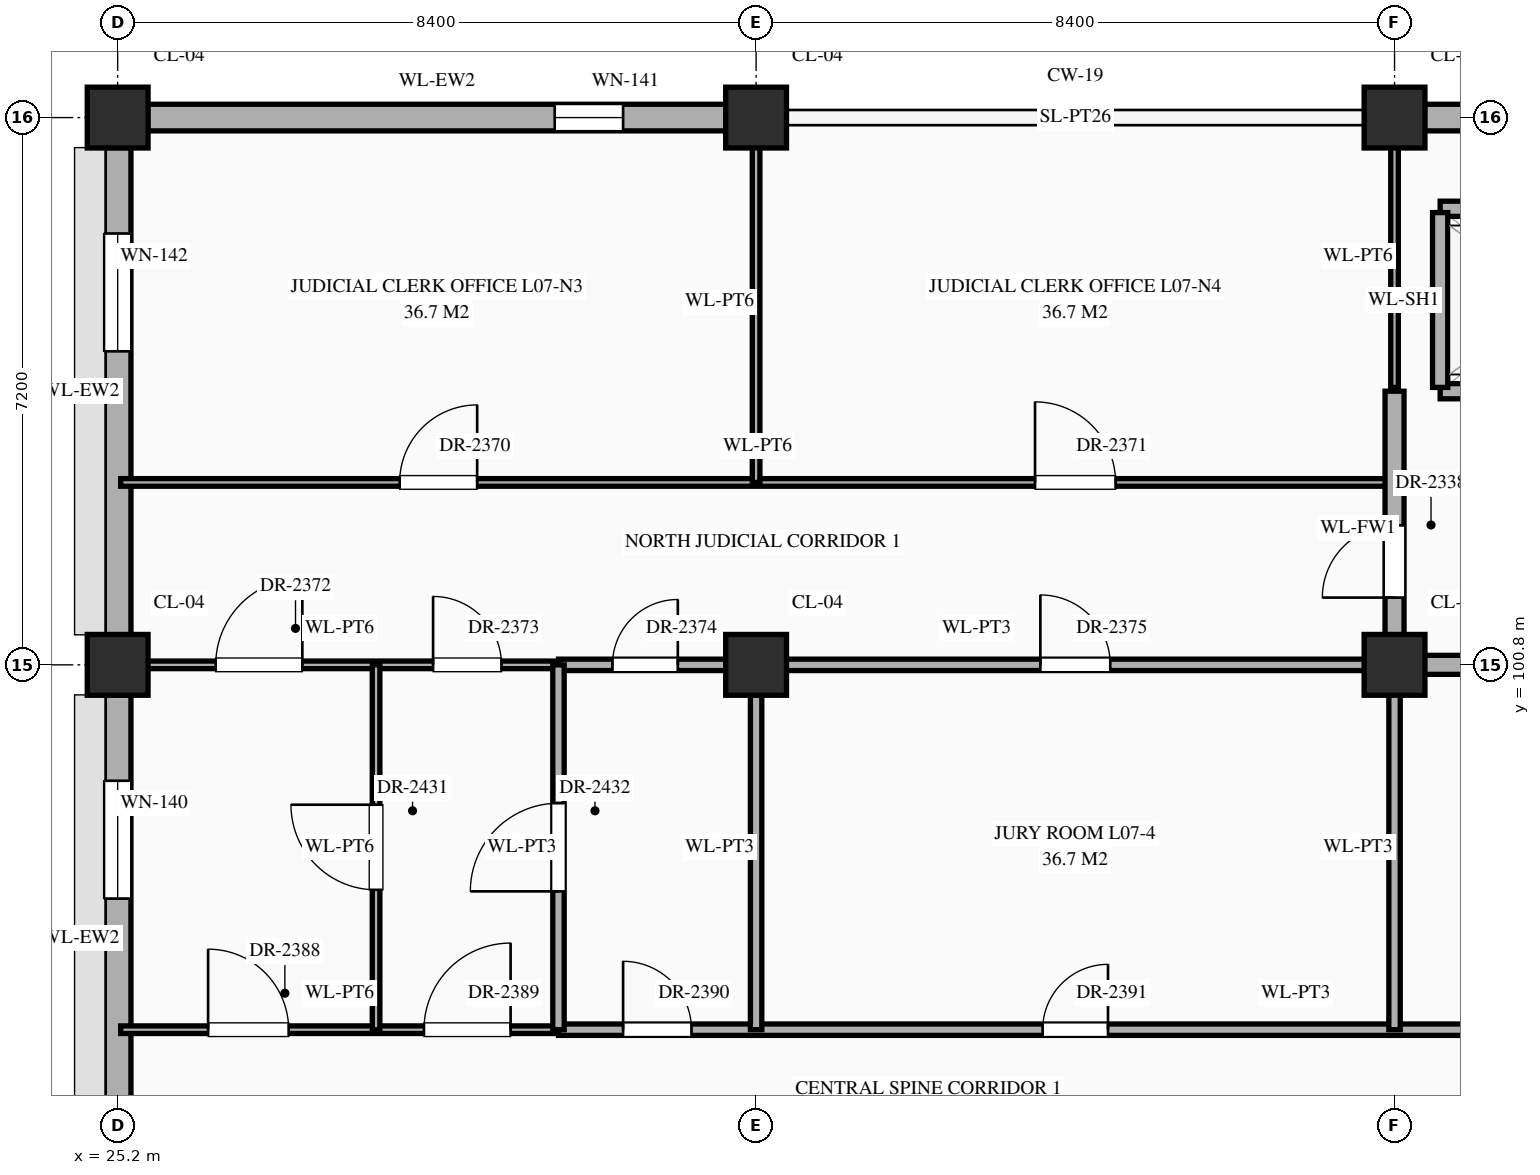
"""IFC4 building model, lengths in metres.
Left out: names, types, materials, properties, quantities, classifications, styles, units other than length and angle.
Written with IfcOpenShell. Run it as: python <this file> out.ifc"""

import sys

from ifc_helpers import new_model, si_unit, direction, frame, frame_2d, origin, origin_2d, place, context, subcontext, project, spatial, rectangle, extrude, element, fill, save


model = new_model("IFC4")
c1 = context("Model", 3, precision=1e-05, world=origin(), true_north=direction((0.0, 1.0)))
c2 = subcontext(c1, "Body", "Model", "MODEL_VIEW")
j1 = project(units=[si_unit("LENGTHUNIT", "METRE"), si_unit("PLANEANGLEUNIT", "RADIAN")], contexts=[c1])
p1 = place(None, origin())
s1 = spatial("IfcSite", under=j1, at=p1, CompositionType="ELEMENT")
p2 = place(p1, origin())
s2 = spatial("IfcBuilding", under=s1, at=p2, CompositionType="ELEMENT")
p3 = place(p2, frame((0.0, 0.0, 30.6)))
s3 = spatial("IfcBuildingStorey", under=s2, at=p3, CompositionType="ELEMENT", Elevation=30.6)
for number, where, z_axis, x_axis in (
    (1, (25.2, 100.8, 0.0), (0.0, 0.0, 1.0), (1.0, 0.0, 0.0)),
    (2, (25.2, 108.0, 0.0), (0.0, 0.0, 1.0), (1.0, 0.0, 0.0)),
    (3, (33.6, 100.8, 0.0), (0.0, 0.0, 1.0), (1.0, 0.0, 0.0)),
    (4, (33.6, 108.0, 0.0), (0.0, 0.0, 1.0), (1.0, 0.0, 0.0)),
    (5, (42.0, 100.8, 0.0), (0.0, 0.0, 1.0), (1.0, 0.0, 0.0)),
    (6, (42.0, 108.0, 0.0), (0.0, 0.0, 1.0), (1.0, 0.0, 0.0)),
):
    element("IfcColumn", number, at=place(p3, frame(where, z_axis=z_axis, x_axis=x_axis)), inside=s3, PredefinedType="COLUMN", context=c2, shape_type="SweptSolid", body=[
        extrude(rectangle(XDim=0.8, YDim=0.8, at=origin_2d()), origin(), (0.0, 0.0, 1.0), 4.5),
    ])
p4 = place(p3, frame((25.2, 93.995, 0.0), z_axis=(0.0, 0.0, 1.0), x_axis=(0.0, 1.0, 0.0)))
e7 = element("IfcWall", 7, at=p4, inside=s3, PredefinedType="STANDARD", context=c2, shape_type="SweptSolid", body=[
    extrude(rectangle(XDim=6.41, YDim=0.35, at=frame_2d((3.205, 0.0))), origin(), (0.0, 0.0, 1.0), 3.65),
])
p5 = place(p4, frame((3.73, 0.0, 0.85)))
e8 = element("IfcOpeningElement", 8, at=p5, cuts=e7, PredefinedType="OPENING", context=c2, shape_type="SweptSolid", body=[
    extrude(rectangle(XDim=1.55, YDim=1.38, at=frame_2d((0.775, 0.69))), frame((0.0, 0.187, 0.0), z_axis=(0.0, -1.0, 0.0), x_axis=(1.0, 0.0, 0.0)), (0.0, 0.0, 1.0), 0.374),
])
p6 = place(p3, frame((25.595, 108.0, 0.0), z_axis=(0.0, 0.0, 1.0), x_axis=(1.0, 0.0, 0.0)))
e9 = element("IfcWall", 9, at=p6, inside=s3, PredefinedType="STANDARD", context=c2, shape_type="SweptSolid", body=[
    extrude(rectangle(XDim=7.61, YDim=0.35, at=frame_2d((3.805, 0.0))), origin(), (0.0, 0.0, 1.0), 3.65),
])
p7 = place(p6, frame((5.355, 0.0, 0.85)))
e10 = element("IfcOpeningElement", 10, at=p7, cuts=e9, PredefinedType="OPENING", context=c2, shape_type="SweptSolid", body=[
    extrude(rectangle(XDim=0.9, YDim=1.56, at=frame_2d((0.45, 0.78))), frame((0.0, 0.187, 0.0), z_axis=(0.0, -1.0, 0.0), x_axis=(1.0, 0.0, 0.0)), (0.0, 0.0, 1.0), 0.374),
])
p8 = place(p3, frame((25.2, 101.195, 0.0), z_axis=(0.0, 0.0, 1.0), x_axis=(0.0, 1.0, 0.0)))
e11 = element("IfcWall", 11, at=p8, inside=s3, PredefinedType="STANDARD", context=c2, shape_type="SweptSolid", body=[
    extrude(rectangle(XDim=6.41, YDim=0.35, at=frame_2d((3.205, 0.0))), origin(), (0.0, 0.0, 1.0), 3.65),
])
p9 = place(p8, frame((3.73, 0.0, 0.85)))
e12 = element("IfcOpeningElement", 12, at=p9, cuts=e11, PredefinedType="OPENING", context=c2, shape_type="SweptSolid", body=[
    extrude(rectangle(XDim=1.55, YDim=1.56, at=frame_2d((0.775, 0.78))), frame((0.0, 0.187, 0.0), z_axis=(0.0, -1.0, 0.0), x_axis=(1.0, 0.0, 0.0)), (0.0, 0.0, 1.0), 0.374),
])
p10 = place(p3, frame((42.395, 108.0, 0.0), z_axis=(0.0, 0.0, 1.0), x_axis=(1.0, 0.0, 0.0)))
e13 = element("IfcWall", 13, at=p10, inside=s3, PredefinedType="STANDARD", context=c2, shape_type="SweptSolid", body=[
    extrude(rectangle(XDim=7.61, YDim=0.35, at=frame_2d((3.805, 0.0))), origin(), (0.0, 0.0, 1.0), 3.59),
])
p11 = place(p3, frame((25.24, 96.0, 0.0), z_axis=(0.0, 0.0, 1.0), x_axis=(1.0, 0.0, 0.0)))
e14 = element("IfcWall", 14, at=p11, inside=s3, PredefinedType="STANDARD", context=c2, shape_type="SweptSolid", body=[
    extrude(rectangle(XDim=5.76, YDim=0.1, at=frame_2d((2.88, 0.0))), origin(), (0.0, 0.0, 1.0), 4.3),
])
p12 = place(p11, frame((1.15, 0.0, 0.0)))
e15 = element("IfcOpeningElement", 15, at=p12, cuts=e14, PredefinedType="OPENING", context=c2, shape_type="SweptSolid", body=[
    extrude(rectangle(XDim=1.06, YDim=2.4, at=frame_2d((0.53, 1.2))), frame((0.0, 0.062, 0.0), z_axis=(0.0, -1.0, 0.0), x_axis=(1.0, 0.0, 0.0)), (0.0, 0.0, 1.0), 0.124),
])
p13 = place(p11, frame((3.99, 0.0, 0.0)))
e16 = element("IfcOpeningElement", 16, at=p13, cuts=e14, PredefinedType="OPENING", context=c2, shape_type="SweptSolid", body=[
    extrude(rectangle(XDim=1.14, YDim=2.4, at=frame_2d((0.57, 1.2))), frame((0.0, 0.062, 0.0), z_axis=(0.0, -1.0, 0.0), x_axis=(1.0, 0.0, 0.0)), (0.0, 0.0, 1.0), 0.124),
])
p14 = place(p3, frame((31.0, 96.0, 0.0), z_axis=(0.0, 0.0, 1.0), x_axis=(1.0, 0.0, 0.0)))
e17 = element("IfcWall", 17, at=p14, inside=s3, PredefinedType="STANDARD", context=c2, shape_type="SweptSolid", body=[
    extrude(rectangle(XDim=19.4, YDim=0.15, at=frame_2d((9.7, 0.0))), origin(), (0.0, 0.0, 1.0), 4.15),
])
p15 = place(p14, frame((0.85, 0.0, 0.0)))
e18 = element("IfcOpeningElement", 18, at=p15, cuts=e17, PredefinedType="OPENING", context=c2, shape_type="SweptSolid", body=[
    extrude(rectangle(XDim=0.9, YDim=2.15, at=frame_2d((0.45, 1.075))), frame((0.0, 0.087, 0.0), z_axis=(0.0, -1.0, 0.0), x_axis=(1.0, 0.0, 0.0)), (0.0, 0.0, 1.0), 0.174),
])
p16 = place(p14, frame((6.37, 0.0, 0.0)))
e19 = element("IfcOpeningElement", 19, at=p16, cuts=e17, PredefinedType="OPENING", context=c2, shape_type="SweptSolid", body=[
    extrude(rectangle(XDim=0.86, YDim=2.1, at=frame_2d((0.43, 1.05))), frame((0.0, 0.087, 0.0), z_axis=(0.0, -1.0, 0.0), x_axis=(1.0, 0.0, 0.0)), (0.0, 0.0, 1.0), 0.174),
])
p17 = place(p14, frame((14.74, 0.0, 0.0)))
e20 = element("IfcOpeningElement", 20, at=p17, cuts=e17, PredefinedType="OPENING", context=c2, shape_type="SweptSolid", body=[
    extrude(rectangle(XDim=0.92, YDim=2.15, at=frame_2d((0.46, 1.075))), frame((0.0, 0.087, 0.0), z_axis=(0.0, -1.0, 0.0), x_axis=(1.0, 0.0, 0.0)), (0.0, 0.0, 1.0), 0.174),
])
p18 = place(p3, frame((25.24, 100.8, 0.0), z_axis=(0.0, 0.0, 1.0), x_axis=(1.0, 0.0, 0.0)))
e21 = element("IfcWall", 21, at=p18, inside=s3, PredefinedType="STANDARD", context=c2, shape_type="SweptSolid", body=[
    extrude(rectangle(XDim=5.76, YDim=0.1, at=frame_2d((2.88, 0.0))), origin(), (0.0, 0.0, 1.0), 3.45),
])
p19 = place(p18, frame((1.25, 0.0, 0.0)))
e22 = element("IfcOpeningElement", 22, at=p19, cuts=e21, PredefinedType="OPENING", context=c2, shape_type="SweptSolid", body=[
    extrude(rectangle(XDim=1.14, YDim=2.4, at=frame_2d((0.57, 1.2))), frame((0.0, 0.062, 0.0), z_axis=(0.0, -1.0, 0.0), x_axis=(1.0, 0.0, 0.0)), (0.0, 0.0, 1.0), 0.124),
])
p20 = place(p18, frame((4.11, 0.0, 0.0)))
e23 = element("IfcOpeningElement", 23, at=p20, cuts=e21, PredefinedType="OPENING", context=c2, shape_type="SweptSolid", body=[
    extrude(rectangle(XDim=0.9, YDim=2.15, at=frame_2d((0.45, 1.075))), frame((0.0, 0.062, 0.0), z_axis=(0.0, -1.0, 0.0), x_axis=(1.0, 0.0, 0.0)), (0.0, 0.0, 1.0), 0.124),
])
p21 = place(p3, frame((31.0, 100.8, 0.0), z_axis=(0.0, 0.0, 1.0), x_axis=(1.0, 0.0, 0.0)))
e24 = element("IfcWall", 24, at=p21, inside=s3, PredefinedType="STANDARD", context=c2, shape_type="SweptSolid", body=[
    extrude(rectangle(XDim=11.0, YDim=0.15, at=frame_2d((5.5, 0.0))), origin(), (0.0, 0.0, 1.0), 3.3),
])
p22 = place(p21, frame((0.71, 0.0, 0.0)))
e25 = element("IfcOpeningElement", 25, at=p22, cuts=e24, PredefinedType="OPENING", context=c2, shape_type="SweptSolid", body=[
    extrude(rectangle(XDim=0.86, YDim=2.1, at=frame_2d((0.43, 1.05))), frame((0.0, 0.087, 0.0), z_axis=(0.0, -1.0, 0.0), x_axis=(1.0, 0.0, 0.0)), (0.0, 0.0, 1.0), 0.174),
])
p23 = place(p21, frame((6.34, 0.0, 0.0)))
e26 = element("IfcOpeningElement", 26, at=p23, cuts=e24, PredefinedType="OPENING", context=c2, shape_type="SweptSolid", body=[
    extrude(rectangle(XDim=0.92, YDim=2.15, at=frame_2d((0.46, 1.075))), frame((0.0, 0.087, 0.0), z_axis=(0.0, -1.0, 0.0), x_axis=(1.0, 0.0, 0.0)), (0.0, 0.0, 1.0), 0.174),
])
p24 = place(p3, frame((42.0, 100.8, 0.0), z_axis=(0.0, 0.0, 1.0), x_axis=(1.0, 0.0, 0.0)))
e27 = element("IfcWall", 27, at=p24, inside=s3, PredefinedType="STANDARD", context=c2, shape_type="SweptSolid", body=[
    extrude(rectangle(XDim=4.2, YDim=0.25, at=frame_2d((2.1, 0.0))), origin(), (0.0, 0.0, 1.0), 3.39),
])
p25 = place(p3, frame((25.24, 103.2, 0.0), z_axis=(0.0, 0.0, 1.0), x_axis=(1.0, 0.0, 0.0)))
e28 = element("IfcWall", 28, at=p25, inside=s3, PredefinedType="STANDARD", context=c2, shape_type="SweptSolid", body=[
    extrude(rectangle(XDim=16.76, YDim=0.1, at=frame_2d((8.38, 0.0))), origin(), (0.0, 0.0, 1.0), 4.15),
])
p26 = place(p25, frame((3.67, 0.0, 0.0)))
e29 = element("IfcOpeningElement", 29, at=p26, cuts=e28, PredefinedType="OPENING", context=c2, shape_type="SweptSolid", body=[
    extrude(rectangle(XDim=1.02, YDim=2.4, at=frame_2d((0.51, 1.2))), frame((0.0, 0.062, 0.0), z_axis=(0.0, -1.0, 0.0), x_axis=(1.0, 0.0, 0.0)), (0.0, 0.0, 1.0), 0.124),
])
p27 = place(p25, frame((12.03, 0.0, 0.0)))
e30 = element("IfcOpeningElement", 30, at=p27, cuts=e28, PredefinedType="OPENING", context=c2, shape_type="SweptSolid", body=[
    extrude(rectangle(XDim=1.06, YDim=2.4, at=frame_2d((0.53, 1.2))), frame((0.0, 0.062, 0.0), z_axis=(0.0, -1.0, 0.0), x_axis=(1.0, 0.0, 0.0)), (0.0, 0.0, 1.0), 0.124),
])
p28 = place(p3, frame((42.6, 104.4, 0.0), z_axis=(0.0, 0.0, 1.0), x_axis=(1.0, 0.0, 0.0)))
e31 = element("IfcWall", 31, at=p28, inside=s3, PredefinedType="STANDARD", context=c2, shape_type="SweptSolid", body=[
    extrude(rectangle(XDim=3.0, YDim=0.2, at=frame_2d((1.5, 0.0))), origin(), (0.0, 0.0, 1.0), 4.24),
])
p29 = place(p28, frame((0.9, 0.0, 0.0)))
e32 = element("IfcOpeningElement", 32, at=p29, cuts=e31, PredefinedType="OPENING", context=c2, shape_type="SweptSolid", body=[
    extrude(rectangle(XDim=1.2, YDim=2.15, at=frame_2d((0.6, 1.075))), frame((0.0, 0.112, 0.0), z_axis=(0.0, -1.0, 0.0), x_axis=(1.0, 0.0, 0.0)), (0.0, 0.0, 1.0), 0.224),
])
p30 = place(p3, frame((42.6, 106.8, 0.0), z_axis=(0.0, 0.0, 1.0), x_axis=(1.0, 0.0, 0.0)))
e33 = element("IfcWall", 33, at=p30, inside=s3, PredefinedType="STANDARD", context=c2, shape_type="SweptSolid", body=[
    extrude(rectangle(XDim=3.0, YDim=0.2, at=frame_2d((1.5, 0.0))), origin(), (0.0, 0.0, 1.0), 4.24),
])
p31 = place(p3, frame((28.6, 96.0, 0.0), z_axis=(0.0, 0.0, 1.0), x_axis=(0.0, 1.0, 0.0)))
e34 = element("IfcWall", 34, at=p31, inside=s3, PredefinedType="STANDARD", context=c2, shape_type="SweptSolid", body=[
    extrude(rectangle(XDim=4.8, YDim=0.1, at=frame_2d((2.4, 0.0))), origin(), (0.0, 0.0, 1.0), 4.3),
])
p32 = place(p31, frame((1.84, 0.0, 0.0)))
e35 = element("IfcOpeningElement", 35, at=p32, cuts=e34, PredefinedType="OPENING", context=c2, shape_type="SweptSolid", body=[
    extrude(rectangle(XDim=1.12, YDim=2.25, at=frame_2d((0.56, 1.125))), frame((0.0, 0.062, 0.0), z_axis=(0.0, -1.0, 0.0), x_axis=(1.0, 0.0, 0.0)), (0.0, 0.0, 1.0), 0.124),
])
p33 = place(p3, frame((31.0, 96.0, 0.0), z_axis=(0.0, 0.0, 1.0), x_axis=(0.0, 1.0, 0.0)))
e36 = element("IfcWall", 36, at=p33, inside=s3, PredefinedType="STANDARD", context=c2, shape_type="SweptSolid", body=[
    extrude(rectangle(XDim=4.8, YDim=0.15, at=frame_2d((2.4, 0.0))), origin(), (0.0, 0.0, 1.0), 4.3),
])
p34 = place(p33, frame((1.82, 0.0, 0.0)))
e37 = element("IfcOpeningElement", 37, at=p34, cuts=e36, PredefinedType="OPENING", context=c2, shape_type="SweptSolid", body=[
    extrude(rectangle(XDim=1.16, YDim=2.3, at=frame_2d((0.58, 1.15))), frame((0.0, 0.087, 0.0), z_axis=(0.0, -1.0, 0.0), x_axis=(1.0, 0.0, 0.0)), (0.0, 0.0, 1.0), 0.174),
])
p35 = place(p3, frame((33.6, 96.0, 0.0), z_axis=(0.0, 0.0, 1.0), x_axis=(0.0, 1.0, 0.0)))
e38 = element("IfcWall", 38, at=p35, inside=s3, PredefinedType="STANDARD", context=c2, shape_type="SweptSolid", body=[
    extrude(rectangle(XDim=4.8, YDim=0.15, at=frame_2d((2.4, 0.0))), origin(), (0.0, 0.0, 1.0), 4.3),
])
p36 = place(p3, frame((33.6, 103.2, 0.0), z_axis=(0.0, 0.0, 1.0), x_axis=(0.0, 1.0, 0.0)))
e39 = element("IfcWall", 39, at=p36, inside=s3, PredefinedType="STANDARD", context=c2, shape_type="SweptSolid", body=[
    extrude(rectangle(XDim=4.76, YDim=0.1, at=frame_2d((2.38, 0.0))), origin(), (0.0, 0.0, 1.0), 3.4),
])
p37 = place(p3, frame((42.0, 96.0, 0.0), z_axis=(0.0, 0.0, 1.0), x_axis=(0.0, 1.0, 0.0)))
e40 = element("IfcWall", 40, at=p37, inside=s3, PredefinedType="STANDARD", context=c2, shape_type="SweptSolid", body=[
    extrude(rectangle(XDim=4.8, YDim=0.15, at=frame_2d((2.4, 0.0))), origin(), (0.0, 0.0, 1.0), 3.4),
])
p38 = place(p3, frame((42.0, 100.8, 0.0), z_axis=(0.0, 0.0, 1.0), x_axis=(0.0, 1.0, 0.0)))
e41 = element("IfcWall", 41, at=p38, inside=s3, PredefinedType="STANDARD", context=c2, shape_type="SweptSolid", body=[
    extrude(rectangle(XDim=3.6, YDim=0.25, at=frame_2d((1.8, 0.0))), origin(), (0.0, 0.0, 1.0), 3.4),
])
p39 = place(p38, frame((0.885, 0.0, 0.0)))
e42 = element("IfcOpeningElement", 42, at=p39, cuts=e41, PredefinedType="OPENING", context=c2, shape_type="SweptSolid", body=[
    extrude(rectangle(XDim=0.95, YDim=2.15, at=frame_2d((0.475, 1.075))), frame((0.0, 0.137, 0.0), z_axis=(0.0, -1.0, 0.0), x_axis=(1.0, 0.0, 0.0)), (0.0, 0.0, 1.0), 0.274),
])
p40 = place(p3, frame((42.0, 104.45, 0.0), z_axis=(0.0, 0.0, 1.0), x_axis=(0.0, 1.0, 0.0)))
e43 = element("IfcWall", 43, at=p40, inside=s3, PredefinedType="STANDARD", context=c2, shape_type="SweptSolid", body=[
    extrude(rectangle(XDim=3.46, YDim=0.1, at=frame_2d((1.73, 0.0))), origin(), (0.0, 0.0, 1.0), 3.4),
])
p41 = place(p3, frame((42.6, 104.45, 0.0), z_axis=(0.0, 0.0, 1.0), x_axis=(0.0, 1.0, 0.0)))
e44 = element("IfcWall", 44, at=p41, inside=s3, PredefinedType="STANDARD", context=c2, shape_type="SweptSolid", body=[
    extrude(rectangle(XDim=2.3, YDim=0.2, at=frame_2d((1.15, 0.0))), origin(), (0.0, 0.0, 1.0), 4.24),
])
p42 = place(p5, origin())
e45 = element("IfcWindow", 45, at=p42, inside=s3, PartitioningType="SINGLE_PANEL", PredefinedType="WINDOW", context=c2, shape_type="SweptSolid", body=[
    extrude(rectangle(XDim=1.55, YDim=1.38, at=frame_2d((0.775, 0.69))), frame((0.0, 0.03, 0.0), z_axis=(0.0, -1.0, 0.0), x_axis=(1.0, 0.0, 0.0)), (0.0, 0.0, 1.0), 0.06),
])
fill(e8, e45)
p43 = place(p7, origin())
e46 = element("IfcWindow", 46, at=p43, inside=s3, PartitioningType="SINGLE_PANEL", PredefinedType="WINDOW", context=c2, shape_type="SweptSolid", body=[
    extrude(rectangle(XDim=0.9, YDim=1.56, at=frame_2d((0.45, 0.78))), frame((0.0, 0.03, 0.0), z_axis=(0.0, -1.0, 0.0), x_axis=(1.0, 0.0, 0.0)), (0.0, 0.0, 1.0), 0.06),
])
fill(e10, e46)
p44 = place(p9, origin())
e47 = element("IfcWindow", 47, at=p44, inside=s3, PartitioningType="SINGLE_PANEL", PredefinedType="WINDOW", context=c2, shape_type="SweptSolid", body=[
    extrude(rectangle(XDim=1.55, YDim=1.56, at=frame_2d((0.775, 0.78))), frame((0.0, 0.03, 0.0), z_axis=(0.0, -1.0, 0.0), x_axis=(1.0, 0.0, 0.0)), (0.0, 0.0, 1.0), 0.06),
])
fill(e12, e47)
p45 = place(p39, origin())
e48 = element("IfcDoor", 48, at=p45, inside=s3, OperationType="SINGLE_SWING_LEFT", PredefinedType="DOOR", context=c2, shape_type="SweptSolid", body=[
    extrude(rectangle(XDim=0.95, YDim=2.15, at=frame_2d((0.475, 1.075))), frame((0.0, 0.025, 0.0), z_axis=(0.0, -1.0, 0.0), x_axis=(1.0, 0.0, 0.0)), (0.0, 0.0, 1.0), 0.05),
])
fill(e42, e48)
p46 = place(p26, origin())
e49 = element("IfcDoor", 49, at=p46, inside=s3, OperationType="SINGLE_SWING_RIGHT", PredefinedType="DOOR", context=c2, shape_type="SweptSolid", body=[
    extrude(rectangle(XDim=1.02, YDim=2.4, at=frame_2d((0.51, 1.2))), frame((0.0, 0.025, 0.0), z_axis=(0.0, -1.0, 0.0), x_axis=(1.0, 0.0, 0.0)), (0.0, 0.0, 1.0), 0.05),
])
fill(e29, e49)
p47 = place(p27, origin())
e50 = element("IfcDoor", 50, at=p47, inside=s3, OperationType="SINGLE_SWING_LEFT", PredefinedType="DOOR", context=c2, shape_type="SweptSolid", body=[
    extrude(rectangle(XDim=1.06, YDim=2.4, at=frame_2d((0.53, 1.2))), frame((0.0, 0.025, 0.0), z_axis=(0.0, -1.0, 0.0), x_axis=(1.0, 0.0, 0.0)), (0.0, 0.0, 1.0), 0.05),
])
fill(e30, e50)
p48 = place(p19, origin())
e51 = element("IfcDoor", 51, at=p48, inside=s3, OperationType="SINGLE_SWING_RIGHT", PredefinedType="DOOR", context=c2, shape_type="SweptSolid", body=[
    extrude(rectangle(XDim=1.14, YDim=2.4, at=frame_2d((0.57, 1.2))), frame((0.0, 0.025, 0.0), z_axis=(0.0, -1.0, 0.0), x_axis=(1.0, 0.0, 0.0)), (0.0, 0.0, 1.0), 0.05),
])
fill(e22, e51)
p49 = place(p20, origin())
e52 = element("IfcDoor", 52, at=p49, inside=s3, OperationType="SINGLE_SWING_LEFT", PredefinedType="DOOR", context=c2, shape_type="SweptSolid", body=[
    extrude(rectangle(XDim=0.9, YDim=2.15, at=frame_2d((0.45, 1.075))), frame((0.0, 0.025, 0.0), z_axis=(0.0, -1.0, 0.0), x_axis=(1.0, 0.0, 0.0)), (0.0, 0.0, 1.0), 0.05),
])
fill(e23, e52)
p50 = place(p22, origin())
e53 = element("IfcDoor", 53, at=p50, inside=s3, OperationType="SINGLE_SWING_RIGHT", PredefinedType="DOOR", context=c2, shape_type="SweptSolid", body=[
    extrude(rectangle(XDim=0.86, YDim=2.1, at=frame_2d((0.43, 1.05))), frame((0.0, 0.025, 0.0), z_axis=(0.0, -1.0, 0.0), x_axis=(1.0, 0.0, 0.0)), (0.0, 0.0, 1.0), 0.05),
])
fill(e25, e53)
p51 = place(p23, origin())
e54 = element("IfcDoor", 54, at=p51, inside=s3, OperationType="SINGLE_SWING_LEFT", PredefinedType="DOOR", context=c2, shape_type="SweptSolid", body=[
    extrude(rectangle(XDim=0.92, YDim=2.15, at=frame_2d((0.46, 1.075))), frame((0.0, 0.025, 0.0), z_axis=(0.0, -1.0, 0.0), x_axis=(1.0, 0.0, 0.0)), (0.0, 0.0, 1.0), 0.05),
])
fill(e26, e54)
p52 = place(p12, origin())
e55 = element("IfcDoor", 55, at=p52, inside=s3, OperationType="SINGLE_SWING_LEFT", PredefinedType="DOOR", context=c2, shape_type="SweptSolid", body=[
    extrude(rectangle(XDim=1.06, YDim=2.4, at=frame_2d((0.53, 1.2))), frame((0.0, 0.025, 0.0), z_axis=(0.0, -1.0, 0.0), x_axis=(1.0, 0.0, 0.0)), (0.0, 0.0, 1.0), 0.05),
])
fill(e15, e55)
p53 = place(p13, origin())
e56 = element("IfcDoor", 56, at=p53, inside=s3, OperationType="SINGLE_SWING_RIGHT", PredefinedType="DOOR", context=c2, shape_type="SweptSolid", body=[
    extrude(rectangle(XDim=1.14, YDim=2.4, at=frame_2d((0.57, 1.2))), frame((0.0, 0.025, 0.0), z_axis=(0.0, -1.0, 0.0), x_axis=(1.0, 0.0, 0.0)), (0.0, 0.0, 1.0), 0.05),
])
fill(e16, e56)
p54 = place(p15, origin())
e57 = element("IfcDoor", 57, at=p54, inside=s3, OperationType="SINGLE_SWING_LEFT", PredefinedType="DOOR", context=c2, shape_type="SweptSolid", body=[
    extrude(rectangle(XDim=0.9, YDim=2.15, at=frame_2d((0.45, 1.075))), frame((0.0, 0.025, 0.0), z_axis=(0.0, -1.0, 0.0), x_axis=(1.0, 0.0, 0.0)), (0.0, 0.0, 1.0), 0.05),
])
fill(e18, e57)
p55 = place(p16, origin())
e58 = element("IfcDoor", 58, at=p55, inside=s3, OperationType="SINGLE_SWING_RIGHT", PredefinedType="DOOR", context=c2, shape_type="SweptSolid", body=[
    extrude(rectangle(XDim=0.86, YDim=2.1, at=frame_2d((0.43, 1.05))), frame((0.0, 0.025, 0.0), z_axis=(0.0, -1.0, 0.0), x_axis=(1.0, 0.0, 0.0)), (0.0, 0.0, 1.0), 0.05),
])
fill(e19, e58)
p56 = place(p32, origin())
e59 = element("IfcDoor", 59, at=p56, inside=s3, OperationType="SINGLE_SWING_RIGHT", PredefinedType="DOOR", context=c2, shape_type="SweptSolid", body=[
    extrude(rectangle(XDim=1.12, YDim=2.25, at=frame_2d((0.56, 1.125))), frame((0.0, 0.025, 0.0), z_axis=(0.0, -1.0, 0.0), x_axis=(1.0, 0.0, 0.0)), (0.0, 0.0, 1.0), 0.05),
])
fill(e35, e59)
p57 = place(p34, origin())
e60 = element("IfcDoor", 60, at=p57, inside=s3, OperationType="SINGLE_SWING_LEFT", PredefinedType="DOOR", context=c2, shape_type="SweptSolid", body=[
    extrude(rectangle(XDim=1.16, YDim=2.3, at=frame_2d((0.58, 1.15))), frame((0.0, 0.025, 0.0), z_axis=(0.0, -1.0, 0.0), x_axis=(1.0, 0.0, 0.0)), (0.0, 0.0, 1.0), 0.05),
])
fill(e37, e60)
save(model, sys.argv[1])
